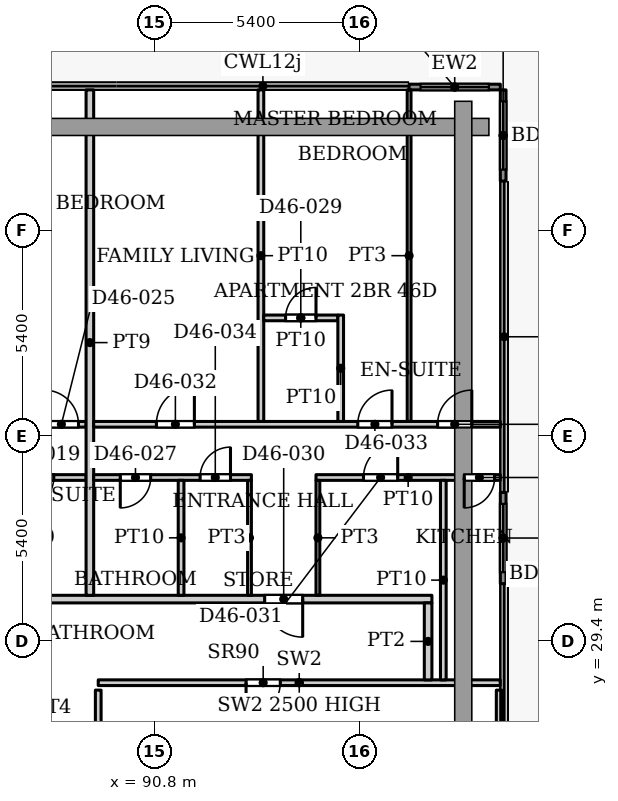
"""IFC4 building model, lengths in metres.
Left out: names, types, materials, properties, quantities, classifications, styles, units other than length and angle.
Written with IfcOpenShell. Run it as: python <this file> out.ifc"""

import sys

from ifc_helpers import new_model, si_unit, direction, frame, frame_2d, origin, place, context, subcontext, project, spatial, rectangle, extrude, source, transform, mapped, element, fill, save


model = new_model("IFC4")
c1 = context("Model", 3, precision=1e-05, world=origin(), true_north=direction((0.0, 1.0)))
c2 = subcontext(c1, "Body", "Model", "MODEL_VIEW")
j1 = project(units=[si_unit("LENGTHUNIT", "METRE"), si_unit("PLANEANGLEUNIT", "RADIAN")], contexts=[c1])
p1 = place(None, origin())
s1 = spatial("IfcSite", under=j1, at=p1, CompositionType="ELEMENT")
p2 = place(p1, origin())
s2 = spatial("IfcBuilding", under=s1, at=p2, CompositionType="ELEMENT")
p3 = place(p2, frame((0.0, 0.0, 195.5)))
s3 = spatial("IfcBuildingStorey", under=s2, at=p3, CompositionType="ELEMENT", Elevation=195.5)
p4 = place(p3, frame((97.5, 43.975, 0.0), z_axis=(0.0, 0.0, 1.0), x_axis=(1.0, 0.0, 0.0)))
e1 = element("IfcWall", 1, at=p4, inside=s3, PredefinedType="SOLIDWALL", context=c2, shape_type="SweptSolid", body=[
    extrude(rectangle(XDim=2.4, YDim=0.15, at=frame_2d((1.2, 0.0))), origin(), (0.0, 0.0, 1.0), 3.75),
])
p5 = place(p4, frame((0.3, 0.0, 0.0)))
e2 = element("IfcOpeningElement", 2, at=p5, cuts=e1, PredefinedType="OPENING", context=c2, shape_type="SweptSolid", body=[
    extrude(rectangle(XDim=1.8, YDim=2.4, at=frame_2d((0.9, 1.2))), frame((0.0, 0.085, 0.0), z_axis=(0.0, -1.0, 0.0), x_axis=(1.0, 0.0, 0.0)), (0.0, 0.0, 1.0), 0.17),
])
p6 = place(p3, frame((99.975, 43.9, 0.0), z_axis=(0.0, 0.0, 1.0), x_axis=(0.0, -1.0, 0.0)))
e3 = element("IfcWall", 3, at=p6, inside=s3, PredefinedType="SOLIDWALL", context=c2, shape_type="SweptSolid", body=[
    extrude(rectangle(XDim=2.4, YDim=0.15, at=frame_2d((1.2, 0.0))), origin(), (0.0, 0.0, 1.0), 3.75),
])
p7 = place(p6, frame((0.3, 0.0, 0.0)))
e4 = element("IfcOpeningElement", 4, at=p7, cuts=e3, PredefinedType="OPENING", context=c2, shape_type="SweptSolid", body=[
    extrude(rectangle(XDim=1.8, YDim=2.4, at=frame_2d((0.9, 1.2))), frame((0.0, 0.085, 0.0), z_axis=(0.0, -1.0, 0.0), x_axis=(1.0, 0.0, 0.0)), (0.0, 0.0, 1.0), 0.17),
])
p8 = place(p3, frame((99.975, 33.307, 0.0), z_axis=(0.0, 0.0, 1.0), x_axis=(0.0, -1.0, 0.0)))
e5 = element("IfcWall", 5, at=p8, inside=s3, PredefinedType="SOLIDWALL", context=c2, shape_type="SweptSolid", body=[
    extrude(rectangle(XDim=2.4, YDim=0.15, at=frame_2d((1.2, 0.0))), origin(), (0.0, 0.0, 1.0), 3.75),
])
p9 = place(p8, frame((0.3, 0.0, 0.0)))
e6 = element("IfcOpeningElement", 6, at=p9, cuts=e5, PredefinedType="OPENING", context=c2, shape_type="SweptSolid", body=[
    extrude(rectangle(XDim=1.8, YDim=2.4, at=frame_2d((0.9, 1.2))), frame((0.0, 0.085, 0.0), z_axis=(0.0, -1.0, 0.0), x_axis=(1.0, 0.0, 0.0)), (0.0, 0.0, 1.0), 0.17),
])
p10 = place(p3, frame((89.32, 28.3, 0.0), z_axis=(0.0, 0.0, 1.0), x_axis=(1.0, 0.0, 0.0)))
e7 = element("IfcWall", 7, at=p10, inside=s3, PredefinedType="PARTITIONING", context=c2, shape_type="SweptSolid", body=[
    extrude(rectangle(XDim=10.578, YDim=0.15, at=frame_2d((5.289, 0.0))), origin(), (0.0, 0.0, 1.0), 2.5),
])
p11 = place(p10, frame((3.89, 0.0, 0.0)))
e8 = element("IfcOpeningElement", 8, at=p11, cuts=e7, PredefinedType="OPENING", context=c2, shape_type="SweptSolid", body=[
    extrude(rectangle(XDim=0.9, YDim=2.2, at=frame_2d((0.45, 1.1))), frame((0.0, 0.085, 0.0), z_axis=(0.0, -1.0, 0.0), x_axis=(1.0, 0.0, 0.0)), (0.0, 0.0, 1.0), 0.17),
])
p12 = place(p3, frame((89.32, 25.62, 0.0), z_axis=(0.0, 0.0, 1.0), x_axis=(0.0, 1.0, 0.0)))
e9 = element("IfcWall", 9, at=p12, inside=s3, PredefinedType="PARTITIONING", context=c2, shape_type="SweptSolid", body=[
    extrude(rectangle(XDim=2.485, YDim=0.15, at=frame_2d((1.242, 0.0))), origin(), (0.0, 0.0, 1.0), 3.9),
])
p13 = place(p3, frame((99.87, 21.015, 0.0), z_axis=(0.0, 0.0, 1.0), x_axis=(0.0, 1.0, 0.0)))
e10 = element("IfcWall", 10, at=p13, inside=s3, PredefinedType="PARTITIONING", context=c2, shape_type="SweptSolid", body=[
    extrude(rectangle(XDim=7.09, YDim=0.15, at=frame_2d((3.545, 0.0))), origin(), (0.0, 0.0, 1.0), 3.9),
])
p14 = place(p3, frame((53.549, 30.5, 0.0), z_axis=(0.0, 0.0, 1.0), x_axis=(1.0, 0.0, 0.0)))
e11 = element("IfcWall", 11, at=p14, inside=s3, PredefinedType="PARTITIONING", context=c2, shape_type="SweptSolid", body=[
    extrude(rectangle(XDim=44.551, YDim=0.2, at=frame_2d((22.275, 0.0))), origin(), (0.0, 0.0, 1.0), 3.6),
])
p15 = place(p14, frame((5.501, 0.0, 0.0)))
e12 = element("IfcOpeningElement", 12, at=p15, cuts=e11, PredefinedType="OPENING", context=c2, shape_type="SweptSolid", body=[
    extrude(rectangle(XDim=1.0, YDim=2.1, at=frame_2d((0.5, 1.05))), frame((0.0, 0.11, 0.0), z_axis=(0.0, -1.0, 0.0), x_axis=(1.0, 0.0, 0.0)), (0.0, 0.0, 1.0), 0.22),
])
p16 = place(p14, frame((20.201, 0.0, 0.0)))
e13 = element("IfcOpeningElement", 13, at=p16, cuts=e11, PredefinedType="OPENING", context=c2, shape_type="SweptSolid", body=[
    extrude(rectangle(XDim=1.0, YDim=2.1, at=frame_2d((0.5, 1.05))), frame((0.0, 0.11, 0.0), z_axis=(0.0, -1.0, 0.0), x_axis=(1.0, 0.0, 0.0)), (0.0, 0.0, 1.0), 0.22),
])
p17 = place(p14, frame((24.251, 0.0, 0.0)))
e14 = element("IfcOpeningElement", 14, at=p17, cuts=e11, PredefinedType="OPENING", context=c2, shape_type="SweptSolid", body=[
    extrude(rectangle(XDim=1.0, YDim=2.1, at=frame_2d((0.5, 1.05))), frame((0.0, 0.11, 0.0), z_axis=(0.0, -1.0, 0.0), x_axis=(1.0, 0.0, 0.0)), (0.0, 0.0, 1.0), 0.22),
])
p18 = place(p14, frame((40.151, 0.0, 0.0)))
e15 = element("IfcOpeningElement", 15, at=p18, cuts=e11, PredefinedType="OPENING", context=c2, shape_type="SweptSolid", body=[
    extrude(rectangle(XDim=1.0, YDim=2.1, at=frame_2d((0.5, 1.05))), frame((0.0, 0.11, 0.0), z_axis=(0.0, -1.0, 0.0), x_axis=(1.0, 0.0, 0.0)), (0.0, 0.0, 1.0), 0.22),
])
p19 = place(p3, frame((77.2, 35.1, 0.0), z_axis=(0.0, 0.0, 1.0), x_axis=(1.0, 0.0, 0.0)))
e16 = element("IfcWall", 16, at=p19, inside=s3, PredefinedType="PARTITIONING", context=c2, shape_type="SweptSolid", body=[
    extrude(rectangle(XDim=11.8, YDim=0.15, at=frame_2d((5.9, 0.0))), origin(), (0.0, 0.0, 1.0), 3.6),
])
p20 = place(p19, frame((6.2, 0.0, 0.0)))
e17 = element("IfcOpeningElement", 17, at=p20, cuts=e16, PredefinedType="OPENING", context=c2, shape_type="SweptSolid", body=[
    extrude(rectangle(XDim=0.9, YDim=2.1, at=frame_2d((0.45, 1.05))), frame((0.0, 0.085, 0.0), z_axis=(0.0, -1.0, 0.0), x_axis=(1.0, 0.0, 0.0)), (0.0, 0.0, 1.0), 0.17),
])
p21 = place(p19, frame((1.95, 0.0, 0.0)))
e18 = element("IfcOpeningElement", 18, at=p21, cuts=e16, PredefinedType="OPENING", context=c2, shape_type="SweptSolid", body=[
    extrude(rectangle(XDim=1.0, YDim=2.1, at=frame_2d((0.5, 1.05))), frame((0.0, 0.085, 0.0), z_axis=(0.0, -1.0, 0.0), x_axis=(1.0, 0.0, 0.0)), (0.0, 0.0, 1.0), 0.17),
])
p22 = place(p19, frame((10.7, 0.0, 0.0)))
e19 = element("IfcOpeningElement", 19, at=p22, cuts=e16, PredefinedType="OPENING", context=c2, shape_type="SweptSolid", body=[
    extrude(rectangle(XDim=0.9, YDim=2.1, at=frame_2d((0.45, 1.05))), frame((0.0, 0.085, 0.0), z_axis=(0.0, -1.0, 0.0), x_axis=(1.0, 0.0, 0.0)), (0.0, 0.0, 1.0), 0.17),
])
p23 = place(p3, frame((80.05, 33.7, 0.0), z_axis=(0.0, 0.0, 1.0), x_axis=(1.0, 0.0, 0.0)))
e20 = element("IfcWall", 20, at=p23, inside=s3, PredefinedType="PARTITIONING", context=c2, shape_type="SweptSolid", body=[
    extrude(rectangle(XDim=8.95, YDim=0.15, at=frame_2d((4.475, 0.0))), origin(), (0.0, 0.0, 1.0), 3.6),
])
p24 = place(p23, frame((7.3, 0.0, 0.0)))
e21 = element("IfcOpeningElement", 21, at=p24, cuts=e20, PredefinedType="OPENING", context=c2, shape_type="SweptSolid", body=[
    extrude(rectangle(XDim=0.8, YDim=2.1, at=frame_2d((0.4, 1.05))), frame((0.0, 0.085, 0.0), z_axis=(0.0, -1.0, 0.0), x_axis=(1.0, 0.0, 0.0)), (0.0, 0.0, 1.0), 0.17),
])
p25 = place(p23, frame((1.6, 0.0, 0.0)))
e22 = element("IfcOpeningElement", 22, at=p25, cuts=e20, PredefinedType="OPENING", context=c2, shape_type="SweptSolid", body=[
    extrude(rectangle(XDim=0.9, YDim=2.1, at=frame_2d((0.45, 1.05))), frame((0.0, 0.085, 0.0), z_axis=(0.0, -1.0, 0.0), x_axis=(1.0, 0.0, 0.0)), (0.0, 0.0, 1.0), 0.17),
])
p26 = place(p23, frame((4.9, 0.0, 0.0)))
e23 = element("IfcOpeningElement", 23, at=p26, cuts=e20, PredefinedType="OPENING", context=c2, shape_type="SweptSolid", body=[
    extrude(rectangle(XDim=0.8, YDim=2.1, at=frame_2d((0.4, 1.05))), frame((0.0, 0.085, 0.0), z_axis=(0.0, -1.0, 0.0), x_axis=(1.0, 0.0, 0.0)), (0.0, 0.0, 1.0), 0.17),
])
p27 = place(p3, frame((89.1, 30.6, 0.0), z_axis=(0.0, 0.0, 1.0), x_axis=(0.0, 1.0, 0.0)))
e24 = element("IfcWall", 24, at=p27, inside=s3, PredefinedType="PARTITIONING", context=c2, shape_type="SweptSolid", body=[
    extrude(rectangle(XDim=13.3, YDim=0.2, at=frame_2d((6.65, 0.0))), origin(), (0.0, 0.0, 1.0), 3.6),
])
p28 = place(p3, frame((89.2, 33.7, 0.0), z_axis=(0.0, 0.0, 1.0), x_axis=(1.0, 0.0, 0.0)))
e25 = element("IfcWall", 25, at=p28, inside=s3, PredefinedType="PARTITIONING", context=c2, shape_type="SweptSolid", body=[
    extrude(rectangle(XDim=4.15, YDim=0.15, at=frame_2d((2.075, 0.0))), origin(), (0.0, 0.0, 1.0), 3.6),
])
p29 = place(p28, frame((0.7, 0.0, 0.0)))
e26 = element("IfcOpeningElement", 26, at=p29, cuts=e25, PredefinedType="OPENING", context=c2, shape_type="SweptSolid", body=[
    extrude(rectangle(XDim=0.8, YDim=2.1, at=frame_2d((0.4, 1.05))), frame((0.0, 0.085, 0.0), z_axis=(0.0, -1.0, 0.0), x_axis=(1.0, 0.0, 0.0)), (0.0, 0.0, 1.0), 0.17),
])
p30 = place(p28, frame((2.8, 0.0, 0.0)))
e27 = element("IfcOpeningElement", 27, at=p30, cuts=e25, PredefinedType="OPENING", context=c2, shape_type="SweptSolid", body=[
    extrude(rectangle(XDim=0.8, YDim=2.1, at=frame_2d((0.4, 1.05))), frame((0.0, 0.085, 0.0), z_axis=(0.0, -1.0, 0.0), x_axis=(1.0, 0.0, 0.0)), (0.0, 0.0, 1.0), 0.17),
])
p31 = place(p3, frame((89.2, 35.1, 0.0), z_axis=(0.0, 0.0, 1.0), x_axis=(1.0, 0.0, 0.0)))
e28 = element("IfcWall", 28, at=p31, inside=s3, PredefinedType="PARTITIONING", context=c2, shape_type="SweptSolid", body=[
    extrude(rectangle(XDim=10.7, YDim=0.15, at=frame_2d((5.35, 0.0))), origin(), (0.0, 0.0, 1.0), 3.6),
])
p32 = place(p31, frame((9.05, 0.0, 0.0)))
e29 = element("IfcOpeningElement", 29, at=p32, cuts=e28, PredefinedType="OPENING", context=c2, shape_type="SweptSolid", body=[
    extrude(rectangle(XDim=0.9, YDim=2.1, at=frame_2d((0.45, 1.05))), frame((0.0, 0.085, 0.0), z_axis=(0.0, -1.0, 0.0), x_axis=(1.0, 0.0, 0.0)), (0.0, 0.0, 1.0), 0.17),
])
p33 = place(p31, frame((1.65, 0.0, 0.0)))
e30 = element("IfcOpeningElement", 30, at=p33, cuts=e28, PredefinedType="OPENING", context=c2, shape_type="SweptSolid", body=[
    extrude(rectangle(XDim=1.0, YDim=2.1, at=frame_2d((0.5, 1.05))), frame((0.0, 0.085, 0.0), z_axis=(0.0, -1.0, 0.0), x_axis=(1.0, 0.0, 0.0)), (0.0, 0.0, 1.0), 0.17),
])
p34 = place(p31, frame((6.95, 0.0, 0.0)))
e31 = element("IfcOpeningElement", 31, at=p34, cuts=e28, PredefinedType="OPENING", context=c2, shape_type="SweptSolid", body=[
    extrude(rectangle(XDim=0.9, YDim=2.1, at=frame_2d((0.45, 1.05))), frame((0.0, 0.085, 0.0), z_axis=(0.0, -1.0, 0.0), x_axis=(1.0, 0.0, 0.0)), (0.0, 0.0, 1.0), 0.17),
])
p35 = place(p3, frame((91.5, 30.6, 0.0), z_axis=(0.0, 0.0, 1.0), x_axis=(0.0, 1.0, 0.0)))
e32 = element("IfcWall", 32, at=p35, inside=s3, PredefinedType="PARTITIONING", context=c2, shape_type="SweptSolid", body=[
    extrude(rectangle(XDim=3.025, YDim=0.15, at=frame_2d((1.512, 0.0))), origin(), (0.0, 0.0, 1.0), 3.6),
])
p36 = place(p3, frame((93.3, 30.6, 0.0), z_axis=(0.0, 0.0, 1.0), x_axis=(0.0, 1.0, 0.0)))
e33 = element("IfcWall", 33, at=p36, inside=s3, PredefinedType="PARTITIONING", context=c2, shape_type="SweptSolid", body=[
    extrude(rectangle(XDim=3.025, YDim=0.1, at=frame_2d((1.512, 0.0))), origin(), (0.0, 0.0, 1.0), 3.6),
])
p37 = place(p3, frame((93.6, 35.175, 0.0), z_axis=(0.0, 0.0, 1.0), x_axis=(0.0, 1.0, 0.0)))
e34 = element("IfcWall", 34, at=p37, inside=s3, PredefinedType="PARTITIONING", context=c2, shape_type="SweptSolid", body=[
    extrude(rectangle(XDim=8.725, YDim=0.15, at=frame_2d((4.362, 0.0))), origin(), (0.0, 0.0, 1.0), 3.6),
])
p38 = place(p3, frame((93.675, 37.9, 0.0), z_axis=(0.0, 0.0, 1.0), x_axis=(1.0, 0.0, 0.0)))
e35 = element("IfcWall", 35, at=p38, inside=s3, PredefinedType="PARTITIONING", context=c2, shape_type="SweptSolid", body=[
    extrude(rectangle(XDim=1.95, YDim=0.15, at=frame_2d((0.975, 0.0))), origin(), (0.0, 0.0, 1.0), 3.6),
])
p39 = place(p38, frame((0.575, 0.0, 0.0)))
e36 = element("IfcOpeningElement", 36, at=p39, cuts=e35, PredefinedType="OPENING", context=c2, shape_type="SweptSolid", body=[
    extrude(rectangle(XDim=0.8, YDim=2.1, at=frame_2d((0.4, 1.05))), frame((0.0, 0.085, 0.0), z_axis=(0.0, -1.0, 0.0), x_axis=(1.0, 0.0, 0.0)), (0.0, 0.0, 1.0), 0.17),
])
p40 = place(p3, frame((95.05, 33.7, 0.0), z_axis=(0.0, 0.0, 1.0), x_axis=(1.0, 0.0, 0.0)))
e37 = element("IfcWall", 37, at=p40, inside=s3, PredefinedType="PARTITIONING", context=c2, shape_type="SweptSolid", body=[
    extrude(rectangle(XDim=4.85, YDim=0.15, at=frame_2d((2.425, 0.0))), origin(), (0.0, 0.0, 1.0), 3.6),
])
p41 = place(p40, frame((1.25, 0.0, 0.0)))
e38 = element("IfcOpeningElement", 38, at=p41, cuts=e37, PredefinedType="OPENING", context=c2, shape_type="SweptSolid", body=[
    extrude(rectangle(XDim=0.9, YDim=2.1, at=frame_2d((0.45, 1.05))), frame((0.0, 0.085, 0.0), z_axis=(0.0, -1.0, 0.0), x_axis=(1.0, 0.0, 0.0)), (0.0, 0.0, 1.0), 0.17),
])
p42 = place(p40, frame((3.9, 0.0, 0.0)))
e39 = element("IfcOpeningElement", 39, at=p42, cuts=e37, PredefinedType="OPENING", context=c2, shape_type="SweptSolid", body=[
    extrude(rectangle(XDim=0.8, YDim=2.1, at=frame_2d((0.4, 1.05))), frame((0.0, 0.085, 0.0), z_axis=(0.0, -1.0, 0.0), x_axis=(1.0, 0.0, 0.0)), (0.0, 0.0, 1.0), 0.17),
])
p43 = place(p3, frame((95.1, 30.6, 0.0), z_axis=(0.0, 0.0, 1.0), x_axis=(0.0, 1.0, 0.0)))
e40 = element("IfcWall", 40, at=p43, inside=s3, PredefinedType="PARTITIONING", context=c2, shape_type="SweptSolid", body=[
    extrude(rectangle(XDim=3.025, YDim=0.1, at=frame_2d((1.512, 0.0))), origin(), (0.0, 0.0, 1.0), 3.6),
])
p44 = place(p3, frame((95.7, 35.175, 0.0), z_axis=(0.0, 0.0, 1.0), x_axis=(0.0, 1.0, 0.0)))
e41 = element("IfcWall", 41, at=p44, inside=s3, PredefinedType="PARTITIONING", context=c2, shape_type="SweptSolid", body=[
    extrude(rectangle(XDim=2.8, YDim=0.15, at=frame_2d((1.4, 0.0))), origin(), (0.0, 0.0, 1.0), 3.6),
])
p45 = place(p3, frame((97.5, 35.175, 0.0), z_axis=(0.0, 0.0, 1.0), x_axis=(0.0, 1.0, 0.0)))
e42 = element("IfcWall", 42, at=p45, inside=s3, PredefinedType="PARTITIONING", context=c2, shape_type="SweptSolid", body=[
    extrude(rectangle(XDim=8.725, YDim=0.1, at=frame_2d((4.362, 0.0))), origin(), (0.0, 0.0, 1.0), 3.6),
])
p46 = place(p3, frame((98.0, 28.374, 0.0), z_axis=(0.0, 0.0, 1.0), x_axis=(0.0, 1.0, 0.0)))
e43 = element("IfcWall", 43, at=p46, inside=s3, PredefinedType="PARTITIONING", context=c2, shape_type="SweptSolid", body=[
    extrude(rectangle(XDim=2.026, YDim=0.2, at=frame_2d((1.013, 0.0))), origin(), (0.0, 0.0, 1.0), 3.6),
])
p47 = place(p3, frame((98.4, 28.374, 0.0), z_axis=(0.0, 0.0, 1.0), x_axis=(0.0, 1.0, 0.0)))
e44 = element("IfcWall", 44, at=p47, inside=s3, PredefinedType="PARTITIONING", context=c2, shape_type="SweptSolid", body=[
    extrude(rectangle(XDim=5.251, YDim=0.15, at=frame_2d((2.625, 0.0))), origin(), (0.0, 0.0, 1.0), 3.6),
])
m1 = source(origin(), c2, "Body", "SweptSolid", [
    extrude(rectangle(XDim=1.8, YDim=2.4, at=frame_2d((0.9, 1.2))), frame((0.0, 0.025, 0.0), z_axis=(0.0, -1.0, 0.0), x_axis=(1.0, 0.0, 0.0)), (0.0, 0.0, 1.0), 0.05),
])
p48 = place(p5, origin())
e45 = element("IfcDoor", 45, at=p48, inside=s3, OperationType="SLIDING_TO_LEFT", PredefinedType="DOOR", context=c2, shape_type="MappedRepresentation", body=[
    mapped(m1, transform((0.0, 0.0, 0.0), x_axis=(1.0, 0.0, 0.0), y_axis=(0.0, 1.0, 0.0), z_axis=(0.0, 0.0, 1.0), scale=1.0)),
])
fill(e2, e45)
p49 = place(p7, origin())
e46 = element("IfcDoor", 46, at=p49, inside=s3, OperationType="SLIDING_TO_LEFT", PredefinedType="DOOR", context=c2, shape_type="MappedRepresentation", body=[
    mapped(m1, transform((0.0, 0.0, 0.0), x_axis=(1.0, 0.0, 0.0), y_axis=(0.0, 1.0, 0.0), z_axis=(0.0, 0.0, 1.0), scale=1.0)),
])
fill(e4, e46)
p50 = place(p9, origin())
e47 = element("IfcDoor", 47, at=p50, inside=s3, OperationType="SLIDING_TO_LEFT", PredefinedType="DOOR", context=c2, shape_type="MappedRepresentation", body=[
    mapped(m1, transform((0.0, 0.0, 0.0), x_axis=(1.0, 0.0, 0.0), y_axis=(0.0, 1.0, 0.0), z_axis=(0.0, 0.0, 1.0), scale=1.0)),
])
fill(e6, e47)
m2 = source(origin(), c2, "Body", "SweptSolid", [
    extrude(rectangle(XDim=0.9, YDim=2.2, at=frame_2d((0.45, 1.1))), frame((0.0, 0.025, 0.0), z_axis=(0.0, -1.0, 0.0), x_axis=(1.0, 0.0, 0.0)), (0.0, 0.0, 1.0), 0.05),
])
p51 = place(p11, origin())
e48 = element("IfcDoor", 48, at=p51, inside=s3, OperationType="SINGLE_SWING_RIGHT", PredefinedType="DOOR", context=c2, shape_type="MappedRepresentation", body=[
    mapped(m2, transform((0.0, 0.0, 0.0), x_axis=(1.0, 0.0, 0.0), y_axis=(0.0, 1.0, 0.0), z_axis=(0.0, 0.0, 1.0), scale=1.0)),
])
fill(e8, e48)
m3 = source(origin(), c2, "Body", "SweptSolid", [
    extrude(rectangle(XDim=0.8, YDim=2.1, at=frame_2d((0.4, 1.05))), frame((0.0, 0.025, 0.0), z_axis=(0.0, -1.0, 0.0), x_axis=(1.0, 0.0, 0.0)), (0.0, 0.0, 1.0), 0.05),
])
p52 = place(p24, origin())
e49 = element("IfcDoor", 49, at=p52, inside=s3, OperationType="SINGLE_SWING_RIGHT", PredefinedType="DOOR", context=c2, shape_type="MappedRepresentation", body=[
    mapped(m3, transform((0.0, 0.0, 0.0), x_axis=(1.0, 0.0, 0.0), y_axis=(0.0, 1.0, 0.0), z_axis=(0.0, 0.0, 1.0), scale=1.0)),
])
fill(e21, e49)
m4 = source(origin(), c2, "Body", "SweptSolid", [
    extrude(rectangle(XDim=0.9, YDim=2.1, at=frame_2d((0.45, 1.05))), frame((0.0, 0.025, 0.0), z_axis=(0.0, -1.0, 0.0), x_axis=(1.0, 0.0, 0.0)), (0.0, 0.0, 1.0), 0.05),
])
p53 = place(p22, origin())
e50 = element("IfcDoor", 50, at=p53, inside=s3, OperationType="SINGLE_SWING_LEFT", PredefinedType="DOOR", context=c2, shape_type="MappedRepresentation", body=[
    mapped(m4, transform((0.0, 0.0, 0.0), x_axis=(1.0, 0.0, 0.0), y_axis=(0.0, 1.0, 0.0), z_axis=(0.0, 0.0, 1.0), scale=1.0)),
])
fill(e19, e50)
p54 = place(p29, origin())
e51 = element("IfcDoor", 51, at=p54, inside=s3, OperationType="SINGLE_SWING_RIGHT", PredefinedType="DOOR", context=c2, shape_type="MappedRepresentation", body=[
    mapped(m3, transform((0.0, 0.0, 0.0), x_axis=(1.0, 0.0, 0.0), y_axis=(0.0, 1.0, 0.0), z_axis=(0.0, 0.0, 1.0), scale=1.0)),
])
fill(e26, e51)
p55 = place(p32, origin())
e52 = element("IfcDoor", 52, at=p55, inside=s3, OperationType="SINGLE_SWING_LEFT", PredefinedType="DOOR", context=c2, shape_type="MappedRepresentation", body=[
    mapped(m4, transform((0.0, 0.0, 0.0), x_axis=(1.0, 0.0, 0.0), y_axis=(0.0, 1.0, 0.0), z_axis=(0.0, 0.0, 1.0), scale=1.0)),
])
fill(e29, e52)
p56 = place(p39, origin())
e53 = element("IfcDoor", 53, at=p56, inside=s3, OperationType="SINGLE_SWING_LEFT", PredefinedType="DOOR", context=c2, shape_type="MappedRepresentation", body=[
    mapped(m3, transform((0.0, 0.0, 0.0), x_axis=(1.0, 0.0, 0.0), y_axis=(0.0, 1.0, 0.0), z_axis=(0.0, 0.0, 1.0), scale=1.0)),
])
fill(e36, e53)
m5 = source(origin(), c2, "Body", "SweptSolid", [
    extrude(rectangle(XDim=1.0, YDim=2.1, at=frame_2d((0.5, 1.05))), frame((0.0, 0.025, 0.0), z_axis=(0.0, -1.0, 0.0), x_axis=(1.0, 0.0, 0.0)), (0.0, 0.0, 1.0), 0.05),
])
p57 = place(p18, origin())
e54 = element("IfcDoor", 54, at=p57, inside=s3, OperationType="SINGLE_SWING_RIGHT", PredefinedType="DOOR", context=c2, shape_type="MappedRepresentation", body=[
    mapped(m5, transform((0.0, 0.0, 0.0), x_axis=(1.0, 0.0, 0.0), y_axis=(0.0, 1.0, 0.0), z_axis=(0.0, 0.0, 1.0), scale=1.0)),
])
fill(e15, e54)
p58 = place(p41, origin())
e55 = element("IfcDoor", 55, at=p58, inside=s3, OperationType="SINGLE_SWING_LEFT", PredefinedType="DOOR", context=c2, shape_type="MappedRepresentation", body=[
    mapped(m4, transform((0.0, 0.0, 0.0), x_axis=(1.0, 0.0, 0.0), y_axis=(0.0, 1.0, 0.0), z_axis=(0.0, 0.0, 1.0), scale=1.0)),
])
fill(e38, e55)
m6 = source(origin(), c2, "Body", "SweptSolid", [
    extrude(rectangle(XDim=1.0, YDim=2.1, at=frame_2d((0.5, 1.05))), frame((0.0, 0.025, 0.0), z_axis=(0.0, -1.0, 0.0), x_axis=(1.0, 0.0, 0.0)), (0.0, 0.0, 1.0), 0.05),
])
p59 = place(p33, origin())
e56 = element("IfcDoor", 56, at=p59, inside=s3, OperationType="SINGLE_SWING_LEFT", PredefinedType="DOOR", context=c2, shape_type="MappedRepresentation", body=[
    mapped(m6, transform((0.0, 0.0, 0.0), x_axis=(1.0, 0.0, 0.0), y_axis=(0.0, 1.0, 0.0), z_axis=(0.0, 0.0, 1.0), scale=1.0)),
])
fill(e30, e56)
p60 = place(p34, origin())
e57 = element("IfcDoor", 57, at=p60, inside=s3, OperationType="SINGLE_SWING_LEFT", PredefinedType="DOOR", context=c2, shape_type="MappedRepresentation", body=[
    mapped(m4, transform((0.0, 0.0, 0.0), x_axis=(1.0, 0.0, 0.0), y_axis=(0.0, 1.0, 0.0), z_axis=(0.0, 0.0, 1.0), scale=1.0)),
])
fill(e31, e57)
p61 = place(p30, origin())
e58 = element("IfcDoor", 58, at=p61, inside=s3, OperationType="SINGLE_SWING_LEFT", PredefinedType="DOOR", context=c2, shape_type="MappedRepresentation", body=[
    mapped(m3, transform((0.0, 0.0, 0.0), x_axis=(1.0, 0.0, 0.0), y_axis=(0.0, 1.0, 0.0), z_axis=(0.0, 0.0, 1.0), scale=1.0)),
])
fill(e27, e58)
p62 = place(p42, origin())
e59 = element("IfcDoor", 59, at=p62, inside=s3, OperationType="SINGLE_SWING_RIGHT", PredefinedType="DOOR", context=c2, shape_type="MappedRepresentation", body=[
    mapped(m3, transform((0.0, 0.0, 0.0), x_axis=(1.0, 0.0, 0.0), y_axis=(0.0, 1.0, 0.0), z_axis=(0.0, 0.0, 1.0), scale=1.0)),
])
fill(e39, e59)
save(model, sys.argv[1])
